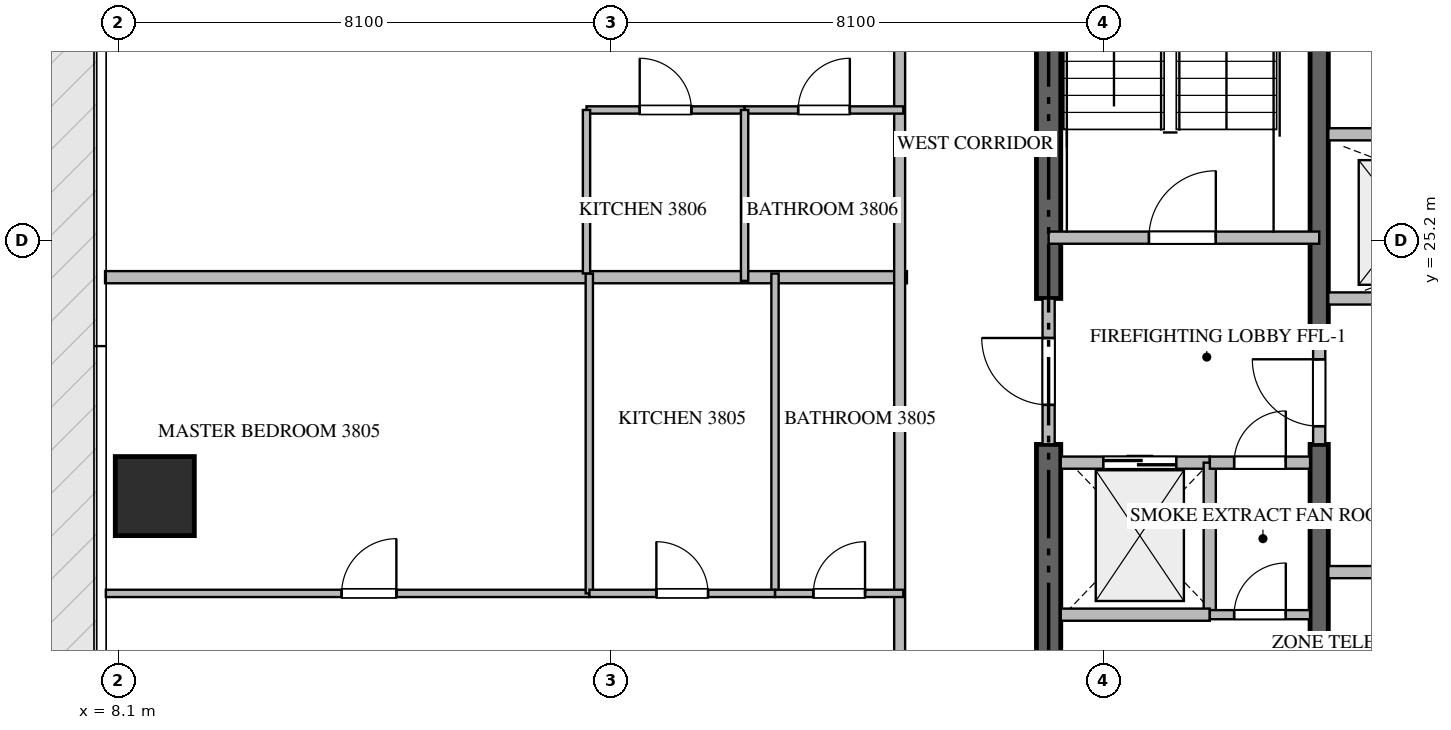
"""IFC4 building model, lengths in metres.
Left out: names, types, materials, properties, quantities, classifications, styles, units other than length and angle.
Written with IfcOpenShell. Run it as: python <this file> out.ifc"""

import sys

from ifc_helpers import new_model, si_unit, direction, frame, frame_2d, origin, origin_2d, place, context, subcontext, project, spatial, rectangle, extrude, source, transform, mapped, element, fill, save


model = new_model("IFC4")
c1 = context("Model", 3, precision=1e-05, world=origin(), true_north=direction((0.0, 1.0)))
c2 = subcontext(c1, "Body", "Model", "MODEL_VIEW")
j1 = project(units=[si_unit("LENGTHUNIT", "METRE"), si_unit("PLANEANGLEUNIT", "RADIAN")], contexts=[c1])
p1 = place(None, origin())
s1 = spatial("IfcSite", under=j1, at=p1, CompositionType="ELEMENT")
p2 = place(p1, origin())
s2 = spatial("IfcBuilding", under=s1, at=p2, CompositionType="ELEMENT")
p3 = place(p2, frame((0.0, 0.0, 153.9)))
s3 = spatial("IfcBuildingStorey", under=s2, at=p3, CompositionType="ELEMENT", Elevation=153.9)
p4 = place(p3, frame((23.4, 17.0, -0.26), z_axis=(0.0, 0.0, 1.0), x_axis=(0.0, 1.0, 0.0)))
e1 = element("IfcWall", 1, at=p4, inside=s3, PredefinedType="SHEAR", context=c2, shape_type="SweptSolid", body=[
    extrude(rectangle(XDim=4.85, YDim=0.4, at=frame_2d((2.425, 0.0))), origin(), (0.0, 0.0, 1.0), 3.748),
])
p5 = place(p3, frame((23.4, 24.25, -0.26), z_axis=(0.0, 0.0, 1.0), x_axis=(0.0, 1.0, 0.0)))
e2 = element("IfcWall", 2, at=p5, inside=s3, PredefinedType="SHEAR", context=c2, shape_type="SweptSolid", body=[
    extrude(rectangle(XDim=9.15, YDim=0.4, at=frame_2d((4.575, 0.0))), origin(), (0.0, 0.0, 1.0), 3.748),
])
p6 = place(p3, frame((27.85, 17.0, -0.26), z_axis=(0.0, 0.0, 1.0), x_axis=(0.0, 1.0, 0.0)))
e3 = element("IfcWall", 3, at=p6, inside=s3, PredefinedType="SHEAR", context=c2, shape_type="SweptSolid", body=[
    extrude(rectangle(XDim=4.85, YDim=0.3, at=frame_2d((2.425, 0.0))), origin(), (0.0, 0.0, 1.0), 3.748),
])
p7 = place(p3, frame((27.85, 23.55, -0.26), z_axis=(0.0, 0.0, 1.0), x_axis=(0.0, 1.0, 0.0)))
e4 = element("IfcWall", 4, at=p7, inside=s3, PredefinedType="SHEAR", context=c2, shape_type="SweptSolid", body=[
    extrude(rectangle(XDim=9.85, YDim=0.3, at=frame_2d((4.925, 0.0))), origin(), (0.0, 0.0, 1.0), 3.748),
])
m1 = source(origin(), c2, "Body", "SweptSolid", [
    extrude(rectangle(XDim=1.3, YDim=1.3, at=origin_2d()), origin(), (0.0, 0.0, 1.0), 3.75),
])
p8 = place(p3, frame((8.7, 21.0, -0.26), z_axis=(0.0, 0.0, 1.0), x_axis=(1.0, 0.0, 0.0)))
e5 = element("IfcColumn", 5, at=p8, inside=s3, PredefinedType="COLUMN", context=c2, shape_type="MappedRepresentation", body=[
    mapped(m1, transform((0.0, 0.0, 0.0), scale=1.0)),
])
p9 = place(p3, frame((23.4, 25.25, 0.0), z_axis=(0.0, 0.0, 1.0), x_axis=(1.0, 0.0, 0.0)))
e6 = element("IfcWall", 6, at=p9, inside=s3, PredefinedType="STANDARD", context=c2, shape_type="SweptSolid", body=[
    extrude(rectangle(XDim=4.45, YDim=0.2, at=frame_2d((2.225, 0.0))), origin(), (0.0, 0.0, 1.0), 3.49),
])
p10 = place(p9, frame((1.65, 0.0, 0.0)))
e7 = element("IfcOpeningElement", 7, at=p10, cuts=e6, PredefinedType="OPENING", context=c2, shape_type="SweptSolid", body=[
    extrude(rectangle(XDim=1.1, YDim=2.15, at=frame_2d((0.55, 1.075))), frame((0.0, 0.11, 0.0), z_axis=(0.0, -1.0, 0.0), x_axis=(1.0, 0.0, 0.0)), (0.0, 0.0, 1.0), 0.22),
])
p11 = place(p3, frame((23.6, 21.55, 0.0), z_axis=(0.0, 0.0, 1.0), x_axis=(1.0, 0.0, 0.0)))
e8 = element("IfcWall", 8, at=p11, inside=s3, PredefinedType="STANDARD", context=c2, shape_type="SweptSolid", body=[
    extrude(rectangle(XDim=2.45, YDim=0.2, at=frame_2d((1.225, 0.0))), origin(), (0.0, 0.0, 1.0), 3.49),
])
p12 = place(p11, frame((0.7, 0.0, 0.0)))
e9 = element("IfcOpeningElement", 9, at=p12, cuts=e8, PredefinedType="OPENING", context=c2, shape_type="SweptSolid", body=[
    extrude(rectangle(XDim=1.2, YDim=2.2, at=frame_2d((0.6, 1.1))), frame((0.0, 0.11, 0.0), z_axis=(0.0, -1.0, 0.0), x_axis=(1.0, 0.0, 0.0)), (0.0, 0.0, 1.0), 0.22),
])
p13 = place(p3, frame((28.0, 24.25, 0.0), z_axis=(0.0, 0.0, 1.0), x_axis=(1.0, 0.0, 0.0)))
e10 = element("IfcWall", 10, at=p13, inside=s3, PredefinedType="STANDARD", context=c2, shape_type="SweptSolid", body=[
    extrude(rectangle(XDim=2.425, YDim=0.2, at=frame_2d((1.212, 0.0))), origin(), (0.0, 0.0, 1.0), 3.49),
])
p14 = place(p13, frame((0.75, 0.0, 0.0)))
e11 = element("IfcOpeningElement", 11, at=p14, cuts=e10, PredefinedType="OPENING", context=c2, shape_type="SweptSolid", body=[
    extrude(rectangle(XDim=1.1, YDim=2.2, at=frame_2d((0.55, 1.1))), frame((0.0, 0.11, 0.0), z_axis=(0.0, -1.0, 0.0), x_axis=(1.0, 0.0, 0.0)), (0.0, 0.0, 1.0), 0.22),
])
p15 = place(p3, frame((26.05, 19.05, 0.0), z_axis=(0.0, 0.0, 1.0), x_axis=(0.0, 1.0, 0.0)))
e12 = element("IfcWall", 12, at=p15, inside=s3, PredefinedType="STANDARD", context=c2, shape_type="SweptSolid", body=[
    extrude(rectangle(XDim=2.5, YDim=0.2, at=frame_2d((1.25, 0.0))), origin(), (0.0, 0.0, 1.0), 3.49),
])
p16 = place(p3, frame((23.6, 19.05, 0.0), z_axis=(0.0, 0.0, 1.0), x_axis=(1.0, 0.0, 0.0)))
e13 = element("IfcWall", 13, at=p16, inside=s3, PredefinedType="STANDARD", context=c2, shape_type="SweptSolid", body=[
    extrude(rectangle(XDim=2.45, YDim=0.2, at=frame_2d((1.225, 0.0))), origin(), (0.0, 0.0, 1.0), 3.49),
])
p17 = place(p3, frame((26.052, 21.55, 0.0), z_axis=(0.0, 0.0, 1.0), x_axis=(1.0, 0.0, 0.0)))
e14 = element("IfcWall", 14, at=p17, inside=s3, PredefinedType="STANDARD", context=c2, shape_type="SweptSolid", body=[
    extrude(rectangle(XDim=1.648, YDim=0.2, at=frame_2d((0.824, 0.0))), origin(), (0.0, 0.0, 1.0), 3.49),
])
p18 = place(p17, frame((0.399, 0.0, 0.0)))
e15 = element("IfcOpeningElement", 15, at=p18, cuts=e14, PredefinedType="OPENING", context=c2, shape_type="SweptSolid", body=[
    extrude(rectangle(XDim=0.85, YDim=2.1, at=frame_2d((0.425, 1.05))), frame((0.0, 0.11, 0.0), z_axis=(0.0, -1.0, 0.0), x_axis=(1.0, 0.0, 0.0)), (0.0, 0.0, 1.0), 0.22),
])
p19 = place(p3, frame((23.4, 21.852, 0.0), z_axis=(0.0, 0.0, 1.0), x_axis=(0.0, 1.0, 0.0)))
e16 = element("IfcWall", 16, at=p19, inside=s3, PredefinedType="STANDARD", context=c2, shape_type="SweptSolid", body=[
    extrude(rectangle(XDim=2.396, YDim=0.2, at=frame_2d((1.198, 0.0))), origin(), (0.0, 0.0, 1.0), 3.49),
])
p20 = place(p19, frame((0.648, 0.0, 0.0)))
e17 = element("IfcOpeningElement", 17, at=p20, cuts=e16, PredefinedType="OPENING", context=c2, shape_type="SweptSolid", body=[
    extrude(rectangle(XDim=1.1, YDim=2.15, at=frame_2d((0.55, 1.075))), frame((0.0, 0.11, 0.0), z_axis=(0.0, -1.0, 0.0), x_axis=(1.0, 0.0, 0.0)), (0.0, 0.0, 1.0), 0.22),
])
p21 = place(p3, frame((27.85, 21.852, 0.0), z_axis=(0.0, 0.0, 1.0), x_axis=(0.0, 1.0, 0.0)))
e18 = element("IfcWall", 18, at=p21, inside=s3, PredefinedType="STANDARD", context=c2, shape_type="SweptSolid", body=[
    extrude(rectangle(XDim=1.696, YDim=0.2, at=frame_2d((0.848, 0.0))), origin(), (0.0, 0.0, 1.0), 3.49),
])
p22 = place(p21, frame((0.298, 0.0, 0.0)))
e19 = element("IfcOpeningElement", 19, at=p22, cuts=e18, PredefinedType="OPENING", context=c2, shape_type="SweptSolid", body=[
    extrude(rectangle(XDim=1.1, YDim=2.15, at=frame_2d((0.55, 1.075))), frame((0.0, 0.11, 0.0), z_axis=(0.0, -1.0, 0.0), x_axis=(1.0, 0.0, 0.0)), (0.0, 0.0, 1.0), 0.22),
])
p23 = place(p3, frame((28.0, 26.95, 0.0), z_axis=(0.0, 0.0, 1.0), x_axis=(1.0, 0.0, 0.0)))
e20 = element("IfcWall", 20, at=p23, inside=s3, PredefinedType="STANDARD", context=c2, shape_type="SweptSolid", body=[
    extrude(rectangle(XDim=6.95, YDim=0.2, at=frame_2d((3.475, 0.0))), origin(), (0.0, 0.0, 1.0), 3.49),
])
p24 = place(p3, frame((26.052, 19.05, 0.0), z_axis=(0.0, 0.0, 1.0), x_axis=(1.0, 0.0, 0.0)))
e21 = element("IfcWall", 21, at=p24, inside=s3, PredefinedType="PARTITIONING", context=c2, shape_type="SweptSolid", body=[
    extrude(rectangle(XDim=1.648, YDim=0.15, at=frame_2d((0.824, 0.0))), origin(), (0.0, 0.0, 1.0), 3.49),
])
p25 = place(p24, frame((0.399, 0.0, 0.0)))
e22 = element("IfcOpeningElement", 22, at=p25, cuts=e21, PredefinedType="OPENING", context=c2, shape_type="SweptSolid", body=[
    extrude(rectangle(XDim=0.85, YDim=2.1, at=frame_2d((0.425, 1.05))), frame((0.0, 0.085, 0.0), z_axis=(0.0, -1.0, 0.0), x_axis=(1.0, 0.0, 0.0)), (0.0, 0.0, 1.0), 0.17),
])
p26 = place(p3, frame((28.0, 19.75, 0.0), z_axis=(0.0, 0.0, 1.0), x_axis=(1.0, 0.0, 0.0)))
e23 = element("IfcWall", 23, at=p26, inside=s3, PredefinedType="STANDARD", context=c2, shape_type="SweptSolid", body=[
    extrude(rectangle(XDim=6.0, YDim=0.2, at=frame_2d((3.0, 0.0))), origin(), (0.0, 0.0, 1.0), 3.49),
])
p27 = place(p26, frame((2.55, 0.0, 0.0)))
e24 = element("IfcOpeningElement", 24, at=p27, cuts=e23, PredefinedType="OPENING", context=c2, shape_type="SweptSolid", body=[
    extrude(rectangle(XDim=0.9, YDim=2.1, at=frame_2d((0.45, 1.05))), frame((0.0, 0.11, 0.0), z_axis=(0.0, -1.0, 0.0), x_axis=(1.0, 0.0, 0.0)), (0.0, 0.0, 1.0), 0.22),
])
p28 = place(p3, frame((7.882, 24.6, 0.0), z_axis=(0.0, 0.0, 1.0), x_axis=(1.0, 0.0, 0.0)))
e25 = element("IfcWall", 25, at=p28, inside=s3, PredefinedType="PARTITIONING", context=c2, shape_type="SweptSolid", body=[
    extrude(rectangle(XDim=13.188, YDim=0.2, at=frame_2d((6.594, 0.0))), origin(), (0.0, 0.0, 1.0), 3.49),
])
p29 = place(p3, frame((20.95, 14.9, 0.0), z_axis=(0.0, 0.0, 1.0), x_axis=(0.0, 1.0, 0.0)))
e26 = element("IfcWall", 26, at=p29, inside=s3, PredefinedType="PARTITIONING", context=c2, shape_type="SweptSolid", body=[
    extrude(rectangle(XDim=18.7, YDim=0.18, at=frame_2d((9.35, 0.0))), origin(), (0.0, 0.0, 1.0), 3.49),
])
p30 = place(p29, frame((1.805, 0.0, 0.0)))
e27 = element("IfcOpeningElement", 27, at=p30, cuts=e26, PredefinedType="OPENING", context=c2, shape_type="SweptSolid", body=[
    extrude(rectangle(XDim=1.0, YDim=2.15, at=frame_2d((0.5, 1.075))), frame((0.0, 0.1, 0.0), z_axis=(0.0, -1.0, 0.0), x_axis=(1.0, 0.0, 0.0)), (0.0, 0.0, 1.0), 0.2),
])
p31 = place(p29, frame((15.027, 0.0, 0.0)))
e28 = element("IfcOpeningElement", 28, at=p31, cuts=e26, PredefinedType="OPENING", context=c2, shape_type="SweptSolid", body=[
    extrude(rectangle(XDim=1.0, YDim=2.15, at=frame_2d((0.5, 1.075))), frame((0.0, 0.1, 0.0), z_axis=(0.0, -1.0, 0.0), x_axis=(1.0, 0.0, 0.0)), (0.0, 0.0, 1.0), 0.2),
])
p32 = place(p3, frame((7.895, 19.4, 0.0), z_axis=(0.0, 0.0, 1.0), x_axis=(1.0, 0.0, 0.0)))
e29 = element("IfcWall", 29, at=p32, inside=s3, PredefinedType="PARTITIONING", context=c2, shape_type="SweptSolid", body=[
    extrude(rectangle(XDim=7.951, YDim=0.12, at=frame_2d((3.976, 0.0))), origin(), (0.0, 0.0, 1.0), 3.49),
])
p33 = place(p32, frame((3.878, 0.0, 0.0)))
e30 = element("IfcOpeningElement", 30, at=p33, cuts=e29, PredefinedType="OPENING", context=c2, shape_type="SweptSolid", body=[
    extrude(rectangle(XDim=0.9, YDim=2.1, at=frame_2d((0.45, 1.05))), frame((0.0, 0.07, 0.0), z_axis=(0.0, -1.0, 0.0), x_axis=(1.0, 0.0, 0.0)), (0.0, 0.0, 1.0), 0.14),
])
for number, where, z_axis, x_axis in (
    (31, (15.846, 19.4, 0.0), (0.0, 0.0, 1.0), (0.0, 1.0, 0.0)),
    (32, (18.9, 19.4, 0.0), (0.0, 0.0, 1.0), (0.0, 1.0, 0.0)),
):
    element("IfcWall", number, at=place(p3, frame(where, z_axis=z_axis, x_axis=x_axis)), inside=s3, PredefinedType="PARTITIONING", context=c2, shape_type="SweptSolid", body=[
        extrude(rectangle(XDim=5.26, YDim=0.12, at=frame_2d((2.63, 0.0))), origin(), (0.0, 0.0, 1.0), 3.49),
    ])
p34 = place(p3, frame((15.848, 19.4, 0.0), z_axis=(0.0, 0.0, 1.0), x_axis=(1.0, 0.0, 0.0)))
e33 = element("IfcWall", 33, at=p34, inside=s3, PredefinedType="PARTITIONING", context=c2, shape_type="SweptSolid", body=[
    extrude(rectangle(XDim=3.052, YDim=0.12, at=frame_2d((1.526, 0.0))), origin(), (0.0, 0.0, 1.0), 3.49),
])
p35 = place(p34, frame((1.101, 0.0, 0.0)))
e34 = element("IfcOpeningElement", 34, at=p35, cuts=e33, PredefinedType="OPENING", context=c2, shape_type="SweptSolid", body=[
    extrude(rectangle(XDim=0.85, YDim=2.1, at=frame_2d((0.425, 1.05))), frame((0.0, 0.07, 0.0), z_axis=(0.0, -1.0, 0.0), x_axis=(1.0, 0.0, 0.0)), (0.0, 0.0, 1.0), 0.14),
])
p36 = place(p3, frame((18.902, 19.4, 0.0), z_axis=(0.0, 0.0, 1.0), x_axis=(1.0, 0.0, 0.0)))
e35 = element("IfcWall", 35, at=p36, inside=s3, PredefinedType="PARTITIONING", context=c2, shape_type="SweptSolid", body=[
    extrude(rectangle(XDim=2.108, YDim=0.12, at=frame_2d((1.054, 0.0))), origin(), (0.0, 0.0, 1.0), 3.49),
])
p37 = place(p36, frame((0.629, 0.0, 0.0)))
e36 = element("IfcOpeningElement", 36, at=p37, cuts=e35, PredefinedType="OPENING", context=c2, shape_type="SweptSolid", body=[
    extrude(rectangle(XDim=0.85, YDim=2.1, at=frame_2d((0.425, 1.05))), frame((0.0, 0.07, 0.0), z_axis=(0.0, -1.0, 0.0), x_axis=(1.0, 0.0, 0.0)), (0.0, 0.0, 1.0), 0.14),
])
p38 = place(p3, frame((15.8, 27.35, 0.0), z_axis=(0.0, 0.0, 1.0), x_axis=(1.0, 0.0, 0.0)))
e37 = element("IfcWall", 37, at=p38, inside=s3, PredefinedType="PARTITIONING", context=c2, shape_type="SweptSolid", body=[
    extrude(rectangle(XDim=2.6, YDim=0.12, at=frame_2d((1.3, 0.0))), origin(), (0.0, 0.0, 1.0), 3.49),
])
p39 = place(p38, frame((0.875, 0.0, 0.0)))
e38 = element("IfcOpeningElement", 38, at=p39, cuts=e37, PredefinedType="OPENING", context=c2, shape_type="SweptSolid", body=[
    extrude(rectangle(XDim=0.85, YDim=2.1, at=frame_2d((0.425, 1.05))), frame((0.0, 0.07, 0.0), z_axis=(0.0, -1.0, 0.0), x_axis=(1.0, 0.0, 0.0)), (0.0, 0.0, 1.0), 0.14),
])
p40 = place(p3, frame((18.402, 27.35, 0.0), z_axis=(0.0, 0.0, 1.0), x_axis=(1.0, 0.0, 0.0)))
e39 = element("IfcWall", 39, at=p40, inside=s3, PredefinedType="PARTITIONING", context=c2, shape_type="SweptSolid", body=[
    extrude(rectangle(XDim=2.608, YDim=0.12, at=frame_2d((1.304, 0.0))), origin(), (0.0, 0.0, 1.0), 3.49),
])
p41 = place(p40, frame((0.879, 0.0, 0.0)))
e40 = element("IfcOpeningElement", 40, at=p41, cuts=e39, PredefinedType="OPENING", context=c2, shape_type="SweptSolid", body=[
    extrude(rectangle(XDim=0.85, YDim=2.1, at=frame_2d((0.425, 1.05))), frame((0.0, 0.07, 0.0), z_axis=(0.0, -1.0, 0.0), x_axis=(1.0, 0.0, 0.0)), (0.0, 0.0, 1.0), 0.14),
])
p42 = place(p3, frame((18.4, 24.54, 0.0), z_axis=(0.0, 0.0, 1.0), x_axis=(0.0, 1.0, 0.0)))
e41 = element("IfcWall", 41, at=p42, inside=s3, PredefinedType="PARTITIONING", context=c2, shape_type="SweptSolid", body=[
    extrude(rectangle(XDim=2.81, YDim=0.12, at=frame_2d((1.405, 0.0))), origin(), (0.0, 0.0, 1.0), 3.49),
])
p43 = place(p3, frame((15.8, 24.662, 0.0), z_axis=(0.0, 0.0, 1.0), x_axis=(0.0, 1.0, 0.0)))
e42 = element("IfcWall", 42, at=p43, inside=s3, PredefinedType="PARTITIONING", context=c2, shape_type="SweptSolid", body=[
    extrude(rectangle(XDim=2.688, YDim=0.12, at=frame_2d((1.344, 0.0))), origin(), (0.0, 0.0, 1.0), 3.49),
])
m2 = source(origin(), c2, "Body", "SweptSolid", [
    extrude(rectangle(XDim=1.1, YDim=2.15, at=frame_2d((0.55, 1.075))), frame((0.0, 0.025, 0.0), z_axis=(0.0, -1.0, 0.0), x_axis=(1.0, 0.0, 0.0)), (0.0, 0.0, 1.0), 0.05),
])
p44 = place(p10, origin())
e43 = element("IfcDoor", 43, at=p44, inside=s3, OperationType="SINGLE_SWING_RIGHT", PredefinedType="DOOR", context=c2, shape_type="MappedRepresentation", body=[
    mapped(m2, transform((0.0, 0.0, 0.0), scale=1.0)),
])
fill(e7, e43)
m3 = source(origin(), c2, "Body", "SweptSolid", [
    extrude(rectangle(XDim=1.2, YDim=2.2, at=frame_2d((0.6, 1.1))), frame((0.0, 0.025, 0.0), z_axis=(0.0, -1.0, 0.0), x_axis=(1.0, 0.0, 0.0)), (0.0, 0.0, 1.0), 0.05),
])
p45 = place(p12, origin())
e44 = element("IfcDoor", 44, at=p45, inside=s3, OperationType="DOUBLE_DOOR_SLIDING", PredefinedType="DOOR", context=c2, shape_type="MappedRepresentation", body=[
    mapped(m3, transform((0.0, 0.0, 0.0), scale=1.0)),
])
fill(e9, e44)
m4 = source(origin(), c2, "Body", "SweptSolid", [
    extrude(rectangle(XDim=0.85, YDim=2.1, at=frame_2d((0.425, 1.05))), frame((0.0, 0.025, 0.0), z_axis=(0.0, -1.0, 0.0), x_axis=(1.0, 0.0, 0.0)), (0.0, 0.0, 1.0), 0.05),
])
p46 = place(p18, origin())
e45 = element("IfcDoor", 45, at=p46, inside=s3, OperationType="SINGLE_SWING_RIGHT", PredefinedType="DOOR", context=c2, shape_type="MappedRepresentation", body=[
    mapped(m4, transform((0.0, 0.0, 0.0), scale=1.0)),
])
fill(e15, e45)
p47 = place(p20, origin())
e46 = element("IfcDoor", 46, at=p47, inside=s3, OperationType="SINGLE_SWING_RIGHT", PredefinedType="DOOR", context=c2, shape_type="MappedRepresentation", body=[
    mapped(m2, transform((0.0, 0.0, 0.0), scale=1.0)),
])
fill(e17, e46)
p48 = place(p22, origin())
e47 = element("IfcDoor", 47, at=p48, inside=s3, OperationType="SINGLE_SWING_RIGHT", PredefinedType="DOOR", context=c2, shape_type="MappedRepresentation", body=[
    mapped(m2, transform((0.0, 0.0, 0.0), scale=1.0)),
])
fill(e19, e47)
p49 = place(p25, origin())
e48 = element("IfcDoor", 48, at=p49, inside=s3, OperationType="SINGLE_SWING_RIGHT", PredefinedType="DOOR", context=c2, shape_type="MappedRepresentation", body=[
    mapped(m4, transform((0.0, 0.0, 0.0), scale=1.0)),
])
fill(e22, e48)
m5 = source(origin(), c2, "Body", "SweptSolid", [
    extrude(rectangle(XDim=0.9, YDim=2.1, at=frame_2d((0.45, 1.05))), frame((0.0, 0.025, 0.0), z_axis=(0.0, -1.0, 0.0), x_axis=(1.0, 0.0, 0.0)), (0.0, 0.0, 1.0), 0.05),
])
p50 = place(p33, origin())
e49 = element("IfcDoor", 49, at=p50, inside=s3, OperationType="SINGLE_SWING_RIGHT", PredefinedType="DOOR", context=c2, shape_type="MappedRepresentation", body=[
    mapped(m5, transform((0.0, 0.0, 0.0), scale=1.0)),
])
fill(e30, e49)
p51 = place(p35, origin())
e50 = element("IfcDoor", 50, at=p51, inside=s3, OperationType="SINGLE_SWING_LEFT", PredefinedType="DOOR", context=c2, shape_type="MappedRepresentation", body=[
    mapped(m4, transform((0.0, 0.0, 0.0), scale=1.0)),
])
fill(e34, e50)
p52 = place(p37, origin())
e51 = element("IfcDoor", 51, at=p52, inside=s3, OperationType="SINGLE_SWING_RIGHT", PredefinedType="DOOR", context=c2, shape_type="MappedRepresentation", body=[
    mapped(m4, transform((0.0, 0.0, 0.0), scale=1.0)),
])
fill(e36, e51)
p53 = place(p39, origin())
e52 = element("IfcDoor", 52, at=p53, inside=s3, OperationType="SINGLE_SWING_LEFT", PredefinedType="DOOR", context=c2, shape_type="MappedRepresentation", body=[
    mapped(m4, transform((0.0, 0.0, 0.0), scale=1.0)),
])
fill(e38, e52)
p54 = place(p41, origin())
e53 = element("IfcDoor", 53, at=p54, inside=s3, OperationType="SINGLE_SWING_RIGHT", PredefinedType="DOOR", context=c2, shape_type="MappedRepresentation", body=[
    mapped(m4, transform((0.0, 0.0, 0.0), scale=1.0)),
])
fill(e40, e53)
save(model, sys.argv[1])
